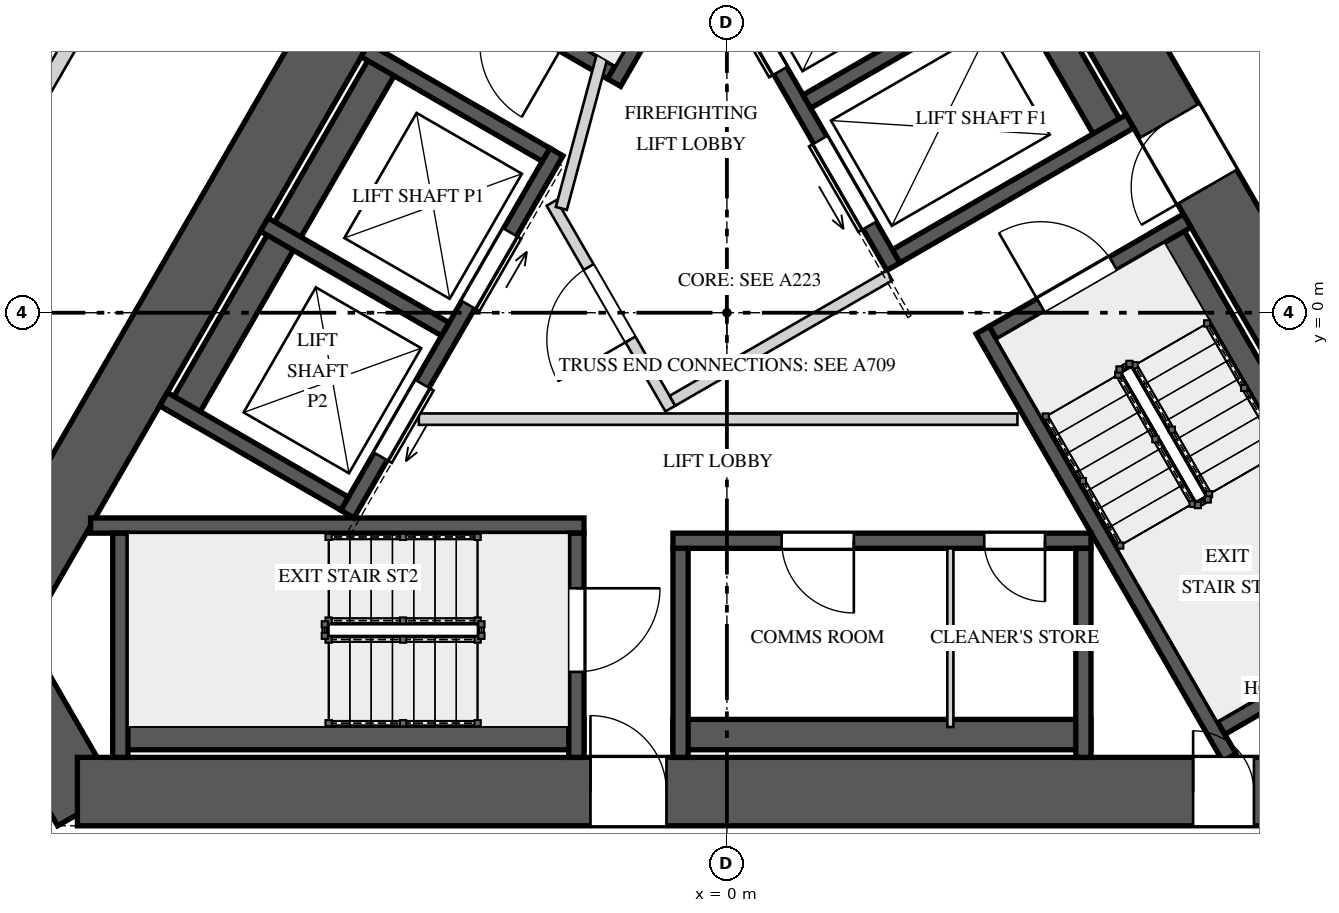
"""IFC4 building model, lengths in metres.
Left out: names, types, materials, properties, quantities, classifications, styles, units other than length and angle.
Written with IfcOpenShell. Run it as: python <this file> out.ifc"""

import sys

from ifc_helpers import new_model, si_unit, direction, frame, frame_2d, origin, place, context, subcontext, project, spatial, rectangle, extrude, element, fill, save


model = new_model("IFC4")
c1 = context("Model", 3, precision=1e-05, world=origin(), true_north=direction((0.0, 1.0)))
c2 = subcontext(c1, "Body", "Model", "MODEL_VIEW")
j1 = project(units=[si_unit("LENGTHUNIT", "METRE"), si_unit("PLANEANGLEUNIT", "RADIAN")], contexts=[c1])
p1 = place(None, origin())
s1 = spatial("IfcSite", under=j1, at=p1, CompositionType="ELEMENT")
p2 = place(p1, origin())
s2 = spatial("IfcBuilding", under=s1, at=p2, CompositionType="ELEMENT")
p3 = place(p2, frame((0.0, 0.0, 157.6)))
s3 = spatial("IfcBuildingStorey", under=s2, at=p3, CompositionType="ELEMENT", Elevation=157.6)
p4 = place(p3, frame((-1.184, 10.55, 0.0), z_axis=(0.0, 0.0, 1.0), x_axis=(-0.500004814304, -0.866022624227, 0.0)))
e1 = element("IfcWall", 1, at=p4, inside=s3, PredefinedType="SHEAR", context=c2, shape_type="SweptSolid", body=[
    extrude(rectangle(XDim=17.09, YDim=0.9, at=frame_2d((8.545, 0.0))), origin(), (0.0, 0.0, 1.0), 5.2),
])
p5 = place(p4, frame((6.75, 0.0, 0.0)))
e2 = element("IfcOpeningElement", 2, at=p5, cuts=e1, PredefinedType="OPENING", context=c2, shape_type="SweptSolid", body=[
    extrude(rectangle(XDim=1.0, YDim=2.4, at=frame_2d((0.5, 1.2))), frame((0.0, 0.46, 0.0), z_axis=(0.0, -1.0, 0.0), x_axis=(1.0, 0.0, 0.0)), (0.0, 0.0, 1.0), 0.92),
])
p6 = place(p3, frame((-9.858, -4.025, 0.0), z_axis=(0.0, 0.0, 1.0), x_axis=(0.500059191753, -0.865991226713, 0.0)))
e3 = element("IfcWall", 3, at=p6, inside=s3, PredefinedType="SHEAR", context=c2, shape_type="SweptSolid", body=[
    extrude(rectangle(XDim=2.887, YDim=0.9, at=frame_2d((1.443, 0.0))), origin(), (0.0, 0.0, 1.0), 5.2),
])
p7 = place(p3, frame((-8.545, -6.3, 0.0), z_axis=(0.0, 0.0, 1.0), x_axis=(1.0, 0.0, 0.0)))
e4 = element("IfcWall", 4, at=p7, inside=s3, PredefinedType="SHEAR", context=c2, shape_type="SweptSolid", body=[
    extrude(rectangle(XDim=17.09, YDim=0.9, at=frame_2d((8.545, 0.0))), origin(), (0.0, 0.0, 1.0), 5.2),
])
p8 = place(p7, frame((6.75, 0.0, 0.0)))
e5 = element("IfcOpeningElement", 5, at=p8, cuts=e4, PredefinedType="OPENING", context=c2, shape_type="SweptSolid", body=[
    extrude(rectangle(XDim=1.0, YDim=2.4, at=frame_2d((0.5, 1.2))), frame((0.0, 0.46, 0.0), z_axis=(0.0, -1.0, 0.0), x_axis=(1.0, 0.0, 0.0)), (0.0, 0.0, 1.0), 0.92),
])
p9 = place(p7, frame((14.678, 0.0, 0.0)))
e6 = element("IfcOpeningElement", 6, at=p9, cuts=e4, PredefinedType="OPENING", context=c2, shape_type="SweptSolid", body=[
    extrude(rectangle(XDim=0.8, YDim=2.1, at=frame_2d((0.4, 1.05))), frame((0.0, 0.46, 0.0), z_axis=(0.0, -1.0, 0.0), x_axis=(1.0, 0.0, 0.0)), (0.0, 0.0, 1.0), 0.92),
])
p10 = place(p3, frame((9.729, -4.25, 0.0), z_axis=(0.0, 0.0, 1.0), x_axis=(-0.500004814304, 0.866022624227, 0.0)))
e7 = element("IfcWall", 7, at=p10, inside=s3, PredefinedType="SHEAR", context=c2, shape_type="SweptSolid", body=[
    extrude(rectangle(XDim=17.09, YDim=0.9, at=frame_2d((8.545, 0.0))), origin(), (0.0, 0.0, 1.0), 5.2),
])
p11 = place(p10, frame((6.82, 0.0, 0.0)))
e8 = element("IfcOpeningElement", 8, at=p11, cuts=e7, PredefinedType="OPENING", context=c2, shape_type="SweptSolid", body=[
    extrude(rectangle(XDim=1.0, YDim=2.4, at=frame_2d((0.5, 1.2))), frame((0.0, 0.46, 0.0), z_axis=(0.0, -1.0, 0.0), x_axis=(1.0, 0.0, 0.0)), (0.0, 0.0, 1.0), 0.92),
])
p12 = place(p10, frame((14.184, 0.0, 0.0)))
e9 = element("IfcOpeningElement", 9, at=p12, cuts=e7, PredefinedType="OPENING", context=c2, shape_type="SweptSolid", body=[
    extrude(rectangle(XDim=0.8, YDim=2.1, at=frame_2d((0.4, 1.05))), frame((0.0, 0.46, 0.0), z_axis=(0.0, -1.0, 0.0), x_axis=(1.0, 0.0, 0.0)), (0.0, 0.0, 1.0), 0.92),
])
p13 = place(p3, frame((1.761, 8.65, 0.0), z_axis=(0.0, 0.0, 1.0), x_axis=(-0.500010023241, -0.866019616786, 0.0)))
e10 = element("IfcWall", 10, at=p13, inside=s3, PredefinedType="SOLIDWALL", context=c2, shape_type="SweptSolid", body=[
    extrude(rectangle(XDim=6.491, YDim=0.2, at=frame_2d((3.246, 0.0))), origin(), (0.0, 0.0, 1.0), 4.85),
])
p14 = place(p3, frame((-1.521, 3.165, 0.0), z_axis=(0.0, 0.0, 1.0), x_axis=(-0.866039495442, 0.49997559174, 0.0)))
e11 = element("IfcWall", 11, at=p14, inside=s3, PredefinedType="SOLIDWALL", context=c2, shape_type="SweptSolid", body=[
    extrude(rectangle(XDim=2.95, YDim=0.2, at=frame_2d((1.475, 0.0))), origin(), (0.0, 0.0, 1.0), 4.85),
])
p15 = place(p14, frame((0.725, 0.0, 0.0)))
e12 = element("IfcOpeningElement", 12, at=p15, cuts=e11, PredefinedType="OPENING", context=c2, shape_type="SweptSolid", body=[
    extrude(rectangle(XDim=1.1, YDim=2.4, at=frame_2d((0.55, 1.2))), frame((0.0, 0.11, 0.0), z_axis=(0.0, -1.0, 0.0), x_axis=(1.0, 0.0, 0.0)), (0.0, 0.0, 1.0), 0.22),
])
p16 = place(p3, frame((-8.08, -5.55, 0.0), z_axis=(0.0, 0.0, 1.0), x_axis=(1.0, 0.0, 0.0)))
e13 = element("IfcWall", 13, at=p16, inside=s3, PredefinedType="SOLIDWALL", context=c2, shape_type="SweptSolid", body=[
    extrude(rectangle(XDim=6.2, YDim=0.4, at=frame_2d((3.1, 0.0))), origin(), (0.0, 0.0, 1.0), 4.85),
])
p17 = place(p3, frame((-8.372, -2.8, 0.0), z_axis=(0.0, 0.0, 1.0), x_axis=(1.0, 0.0, 0.0)))
e14 = element("IfcWall", 14, at=p17, inside=s3, PredefinedType="SOLIDWALL", context=c2, shape_type="SweptSolid", body=[
    extrude(rectangle(XDim=6.492, YDim=0.2, at=frame_2d((3.246, 0.0))), origin(), (0.0, 0.0, 1.0), 4.85),
])
p18 = place(p3, frame((-7.98, -2.9, 0.0), z_axis=(0.0, 0.0, 1.0), x_axis=(0.0, -1.0, 0.0)))
e15 = element("IfcWall", 15, at=p18, inside=s3, PredefinedType="SOLIDWALL", context=c2, shape_type="SweptSolid", body=[
    extrude(rectangle(XDim=2.95, YDim=0.2, at=frame_2d((1.475, 0.0))), origin(), (0.0, 0.0, 1.0), 4.85),
])
p19 = place(p3, frame((-1.98, -2.9, 0.0), z_axis=(0.0, 0.0, 1.0), x_axis=(0.0, -1.0, 0.0)))
e16 = element("IfcWall", 16, at=p19, inside=s3, PredefinedType="SOLIDWALL", context=c2, shape_type="SweptSolid", body=[
    extrude(rectangle(XDim=2.95, YDim=0.2, at=frame_2d((1.475, 0.0))), origin(), (0.0, 0.0, 1.0), 4.85),
])
p20 = place(p19, frame((0.725, 0.0, 0.0)))
e17 = element("IfcOpeningElement", 17, at=p20, cuts=e16, PredefinedType="OPENING", context=c2, shape_type="SweptSolid", body=[
    extrude(rectangle(XDim=1.1, YDim=2.4, at=frame_2d((0.55, 1.2))), frame((0.0, 0.11, 0.0), z_axis=(0.0, -1.0, 0.0), x_axis=(1.0, 0.0, 0.0)), (0.0, 0.0, 1.0), 0.22),
])
p21 = place(p3, frame((8.846, -4.222, 0.0), z_axis=(0.0, 0.0, 1.0), x_axis=(-0.500009909098, 0.866019682689, 0.0)))
e18 = element("IfcWall", 18, at=p21, inside=s3, PredefinedType="SOLIDWALL", context=c2, shape_type="SweptSolid", body=[
    extrude(rectangle(XDim=6.2, YDim=0.4, at=frame_2d((3.1, 0.0))), origin(), (0.0, 0.0, 1.0), 4.85),
])
p22 = place(p3, frame((6.611, -5.85, 0.0), z_axis=(0.0, 0.0, 1.0), x_axis=(-0.499965531574, 0.866045303225, 0.0)))
e19 = element("IfcWall", 19, at=p22, inside=s3, PredefinedType="SOLIDWALL", context=c2, shape_type="SweptSolid", body=[
    extrude(rectangle(XDim=6.492, YDim=0.2, at=frame_2d((3.246, 0.0))), origin(), (0.0, 0.0, 1.0), 4.85),
])
p23 = place(p3, frame((6.501, -5.461, 0.0), z_axis=(0.0, 0.0, 1.0), x_axis=(0.866003658127, 0.500037662692, 0.0)))
e20 = element("IfcWall", 20, at=p23, inside=s3, PredefinedType="SOLIDWALL", context=c2, shape_type="SweptSolid", body=[
    extrude(rectangle(XDim=2.95, YDim=0.2, at=frame_2d((1.475, 0.0))), origin(), (0.0, 0.0, 1.0), 4.85),
])
p24 = place(p3, frame((3.501, -0.265, 0.0), z_axis=(0.0, 0.0, 1.0), x_axis=(0.866039495442, 0.49997559174, 0.0)))
e21 = element("IfcWall", 21, at=p24, inside=s3, PredefinedType="SOLIDWALL", context=c2, shape_type="SweptSolid", body=[
    extrude(rectangle(XDim=2.95, YDim=0.2, at=frame_2d((1.475, 0.0))), origin(), (0.0, 0.0, 1.0), 4.85),
])
p25 = place(p24, frame((0.725, 0.0, 0.0)))
e22 = element("IfcOpeningElement", 22, at=p25, cuts=e21, PredefinedType="OPENING", context=c2, shape_type="SweptSolid", body=[
    extrude(rectangle(XDim=1.1, YDim=2.4, at=frame_2d((0.55, 1.2))), frame((0.0, 0.11, 0.0), z_axis=(0.0, -1.0, 0.0), x_axis=(1.0, 0.0, 0.0)), (0.0, 0.0, 1.0), 0.22),
])
p26 = place(p3, frame((-2.243, 2.115, 0.0), z_axis=(0.0, 0.0, 1.0), x_axis=(-0.499996545922, -0.866027397988, 0.0)))
e23 = element("IfcWall", 23, at=p26, inside=s3, PredefinedType="SOLIDWALL", context=c2, shape_type="SweptSolid", body=[
    extrude(rectangle(XDim=5.5, YDim=0.2, at=frame_2d((2.75, 0.0))), origin(), (0.0, 0.0, 1.0), 4.85),
])
p27 = place(p26, frame((1.22, 0.0, 0.0)))
e24 = element("IfcOpeningElement", 24, at=p27, cuts=e23, PredefinedType="OPENING", context=c2, shape_type="SweptSolid", body=[
    extrude(rectangle(XDim=1.1, YDim=2.1, at=frame_2d((0.55, 1.05))), frame((0.0, 0.11, 0.0), z_axis=(0.0, -1.0, 0.0), x_axis=(1.0, 0.0, 0.0)), (0.0, 0.0, 1.0), 0.22),
])
p28 = place(p26, frame((3.525, 0.0, 0.0)))
e25 = element("IfcOpeningElement", 25, at=p28, cuts=e23, PredefinedType="OPENING", context=c2, shape_type="SweptSolid", body=[
    extrude(rectangle(XDim=1.1, YDim=2.1, at=frame_2d((0.55, 1.05))), frame((0.0, 0.11, 0.0), z_axis=(0.0, -1.0, 0.0), x_axis=(1.0, 0.0, 0.0)), (0.0, 0.0, 1.0), 0.22),
])
p29 = place(p3, frame((-4.451, 3.39, 0.0), z_axis=(0.0, 0.0, 1.0), x_axis=(-0.499996545922, -0.866027397988, 0.0)))
e26 = element("IfcWall", 26, at=p29, inside=s3, PredefinedType="SOLIDWALL", context=c2, shape_type="SweptSolid", body=[
    extrude(rectangle(XDim=5.5, YDim=0.4, at=frame_2d((2.75, 0.0))), origin(), (0.0, 0.0, 1.0), 4.85),
])
for number, where, z_axis, x_axis in (
    (27, (-2.38, 2.078, 0.0), (0.0, 0.0, 1.0), (-0.866, 0.5, 0.0)),
    (28, (-3.705, -0.217, 0.0), (0.0, 0.0, 1.0), (-0.866, 0.5, 0.0)),
):
    element("IfcWall", number, at=place(p3, frame(where, z_axis=z_axis, x_axis=x_axis)), inside=s3, PredefinedType="SOLIDWALL", context=c2, shape_type="SweptSolid", body=[
        extrude(rectangle(XDim=2.75, YDim=0.2, at=frame_2d((1.375, 0.0))), origin(), (0.0, 0.0, 1.0), 4.85),
    ])
p30 = place(p3, frame((-5.03, -2.512, 0.0), z_axis=(0.0, 0.0, 1.0), x_axis=(-0.866005201286, 0.500034990121, 0.0)))
e29 = element("IfcWall", 29, at=p30, inside=s3, PredefinedType="SOLIDWALL", context=c2, shape_type="SweptSolid", body=[
    extrude(rectangle(XDim=2.75, YDim=0.2, at=frame_2d((1.375, 0.0))), origin(), (0.0, 0.0, 1.0), 4.85),
])
p31 = place(p3, frame((4.79, -3.0, 0.0), z_axis=(0.0, 0.0, 1.0), x_axis=(-1.0, 0.0, 0.0)))
e30 = element("IfcWall", 30, at=p31, inside=s3, PredefinedType="SOLIDWALL", context=c2, shape_type="SweptSolid", body=[
    extrude(rectangle(XDim=5.5, YDim=0.2, at=frame_2d((2.75, 0.0))), origin(), (0.0, 0.0, 1.0), 4.85),
])
p32 = place(p31, frame((3.12, 0.0, 0.0)))
e31 = element("IfcOpeningElement", 31, at=p32, cuts=e30, PredefinedType="OPENING", context=c2, shape_type="SweptSolid", body=[
    extrude(rectangle(XDim=0.95, YDim=2.4, at=frame_2d((0.475, 1.2))), frame((0.0, 0.11, 0.0), z_axis=(0.0, -1.0, 0.0), x_axis=(1.0, 0.0, 0.0)), (0.0, 0.0, 1.0), 0.22),
])
p33 = place(p31, frame((0.605, 0.0, 0.0)))
e32 = element("IfcOpeningElement", 32, at=p33, cuts=e30, PredefinedType="OPENING", context=c2, shape_type="SweptSolid", body=[
    extrude(rectangle(XDim=0.8, YDim=2.1, at=frame_2d((0.4, 1.05))), frame((0.0, 0.11, 0.0), z_axis=(0.0, -1.0, 0.0), x_axis=(1.0, 0.0, 0.0)), (0.0, 0.0, 1.0), 0.22),
])
p34 = place(p3, frame((-0.71, -5.55, 0.0), z_axis=(0.0, 0.0, 1.0), x_axis=(1.0, 0.0, 0.0)))
e33 = element("IfcWall", 33, at=p34, inside=s3, PredefinedType="SOLIDWALL", context=c2, shape_type="SweptSolid", body=[
    extrude(rectangle(XDim=5.5, YDim=0.4, at=frame_2d((2.75, 0.0))), origin(), (0.0, 0.0, 1.0), 4.85),
])
for number, where, z_axis, x_axis in (
    (34, (-0.61, -3.1, 0.0), (0.0, 0.0, 1.0), (0.0, -1.0, 0.0)),
    (35, (4.69, -3.1, 0.0), (0.0, 0.0, 1.0), (0.0, -1.0, 0.0)),
):
    element("IfcWall", number, at=place(p3, frame(where, z_axis=z_axis, x_axis=x_axis)), inside=s3, PredefinedType="SOLIDWALL", context=c2, shape_type="SweptSolid", body=[
        extrude(rectangle(XDim=2.75, YDim=0.2, at=frame_2d((1.375, 0.0))), origin(), (0.0, 0.0, 1.0), 4.85),
    ])
p35 = place(p3, frame((2.94, -3.1, 0.0), z_axis=(0.0, 0.0, 1.0), x_axis=(0.0, -1.0, 0.0)))
e36 = element("IfcWall", 36, at=p35, inside=s3, PredefinedType="PARTITIONING", context=c2, shape_type="SweptSolid", body=[
    extrude(rectangle(XDim=2.35, YDim=0.08, at=frame_2d((1.175, 0.0))), origin(), (0.0, 0.0, 1.0), 4.85),
])
p36 = place(p3, frame((2.19, 0.606, 0.0), z_axis=(0.0, 0.0, 1.0), x_axis=(-0.500002801628, 0.866023786258, 0.0)))
e37 = element("IfcWall", 37, at=p36, inside=s3, PredefinedType="SOLIDWALL", context=c2, shape_type="SweptSolid", body=[
    extrude(rectangle(XDim=4.9, YDim=0.2, at=frame_2d((2.45, 0.0))), origin(), (0.0, 0.0, 1.0), 4.85),
])
p37 = place(p36, frame((0.625, 0.0, 0.0)))
e38 = element("IfcOpeningElement", 38, at=p37, cuts=e37, PredefinedType="OPENING", context=c2, shape_type="SweptSolid", body=[
    extrude(rectangle(XDim=1.3, YDim=2.1, at=frame_2d((0.65, 1.05))), frame((0.0, 0.11, 0.0), z_axis=(0.0, -1.0, 0.0), x_axis=(1.0, 0.0, 0.0)), (0.0, 0.0, 1.0), 0.22),
])
p38 = place(p36, frame((2.975, 0.0, 0.0)))
e39 = element("IfcOpeningElement", 39, at=p38, cuts=e37, PredefinedType="OPENING", context=c2, shape_type="SweptSolid", body=[
    extrude(rectangle(XDim=1.3, YDim=2.1, at=frame_2d((0.65, 1.05))), frame((0.0, 0.11, 0.0), z_axis=(0.0, -1.0, 0.0), x_axis=(1.0, 0.0, 0.0)), (0.0, 0.0, 1.0), 0.22),
])
p39 = place(p3, frame((5.092, 2.281, 0.0), z_axis=(0.0, 0.0, 1.0), x_axis=(-0.500018594424, 0.866014668023, 0.0)))
e40 = element("IfcWall", 40, at=p39, inside=s3, PredefinedType="SOLIDWALL", context=c2, shape_type="SweptSolid", body=[
    extrude(rectangle(XDim=4.9, YDim=0.4, at=frame_2d((2.45, 0.0))), origin(), (0.0, 0.0, 1.0), 4.85),
])
for number, where, z_axis, x_axis in (
    (41, (2.227, 0.743, 0.0), (0.0, 0.0, 1.0), (0.866, 0.5, 0.0)),
    (42, (1.052, 2.778, 0.0), (0.0, 0.0, 1.0), (0.866, 0.5, 0.0)),
):
    element("IfcWall", number, at=place(p3, frame(where, z_axis=z_axis, x_axis=x_axis)), inside=s3, PredefinedType="SOLIDWALL", context=c2, shape_type="SweptSolid", body=[
        extrude(rectangle(XDim=3.55, YDim=0.2, at=frame_2d((1.775, 0.0))), origin(), (0.0, 0.0, 1.0), 4.85),
    ])
p40 = place(p3, frame((-0.744, -1.261, 0.0), z_axis=(0.0, 0.0, 1.0), x_axis=(-0.500004234368, 0.866022959057, 0.0)))
e43 = element("IfcWall", 43, at=p40, inside=s3, PredefinedType="PARTITIONING", context=c2, shape_type="SweptSolid", body=[
    extrude(rectangle(XDim=3.125, YDim=0.15, at=frame_2d((1.562, 0.0))), origin(), (0.0, 0.0, 1.0), 4.85),
])
p41 = place(p40, frame((1.05, 0.0, 0.0)))
e44 = element("IfcOpeningElement", 44, at=p41, cuts=e43, PredefinedType="OPENING", context=c2, shape_type="SweptSolid", body=[
    extrude(rectangle(XDim=1.1, YDim=2.4, at=frame_2d((0.55, 1.2))), frame((0.0, 0.085, 0.0), z_axis=(0.0, -1.0, 0.0), x_axis=(1.0, 0.0, 0.0)), (0.0, 0.0, 1.0), 0.17),
])
p42 = place(p3, frame((-0.717, -1.159, 0.0), z_axis=(0.0, 0.0, 1.0), x_axis=(0.866008176907, 0.50002983664, 0.0)))
e45 = element("IfcWall", 45, at=p42, inside=s3, PredefinedType="PARTITIONING", context=c2, shape_type="SweptSolid", body=[
    extrude(rectangle(XDim=3.3, YDim=0.15, at=frame_2d((1.65, 0.0))), origin(), (0.0, 0.0, 1.0), 4.85),
])
p43 = place(p3, frame((-2.178, 1.372, 0.0), z_axis=(0.0, 0.0, 1.0), x_axis=(0.258808958833, 0.96592852884, 0.0)))
e46 = element("IfcWall", 46, at=p43, inside=s3, PredefinedType="PARTITIONING", context=c2, shape_type="SweptSolid", body=[
    extrude(rectangle(XDim=2.903, YDim=0.15, at=frame_2d((1.451, 0.0))), origin(), (0.0, 0.0, 1.0), 4.85),
])
p44 = place(p3, frame((-4.053, -1.4, 0.0), z_axis=(0.0, 0.0, 1.0), x_axis=(1.0, 0.0, 0.0)))
e47 = element("IfcWall", 47, at=p44, inside=s3, PredefinedType="PARTITIONING", context=c2, shape_type="SweptSolid", body=[
    extrude(rectangle(XDim=7.876, YDim=0.15, at=frame_2d((3.938, 0.0))), origin(), (0.0, 0.0, 1.0), 4.85),
])
p45 = place(p3, frame((-9.001, 2.909, 0.0), z_axis=(0.0, 0.0, 1.0), x_axis=(0.50012879774, 0.865951029603, 0.0)))
e48 = element("IfcWall", 48, at=p45, inside=s3, PredefinedType="SOLIDWALL", context=c2, shape_type="SweptSolid", body=[
    extrude(rectangle(XDim=0.711, YDim=0.2, at=frame_2d((0.355, 0.0))), origin(), (0.0, 0.0, 1.0), 4.15),
])
p46 = place(p20, origin())
e49 = element("IfcDoor", 49, at=p46, inside=s3, OperationType="SINGLE_SWING_LEFT", PredefinedType="DOOR", context=c2, shape_type="SweptSolid", body=[
    extrude(rectangle(XDim=1.1, YDim=2.4, at=frame_2d((0.55, 1.2))), frame((0.0, 0.025, 0.0), z_axis=(0.0, -1.0, 0.0), x_axis=(1.0, 0.0, 0.0)), (0.0, 0.0, 1.0), 0.05),
])
fill(e17, e49)
p47 = place(p25, origin())
e50 = element("IfcDoor", 50, at=p47, inside=s3, OperationType="SINGLE_SWING_RIGHT", PredefinedType="DOOR", context=c2, shape_type="SweptSolid", body=[
    extrude(rectangle(XDim=1.1, YDim=2.4, at=frame_2d((0.55, 1.2))), frame((0.0, 0.025, 0.0), z_axis=(0.0, -1.0, 0.0), x_axis=(1.0, 0.0, 0.0)), (0.0, 0.0, 1.0), 0.05),
])
fill(e22, e50)
p48 = place(p27, origin())
e51 = element("IfcDoor", 51, at=p48, inside=s3, OperationType="SLIDING_TO_LEFT", PredefinedType="DOOR", context=c2, shape_type="SweptSolid", body=[
    extrude(rectangle(XDim=1.1, YDim=2.1, at=frame_2d((0.55, 1.05))), frame((0.0, 0.025, 0.0), z_axis=(0.0, -1.0, 0.0), x_axis=(1.0, 0.0, 0.0)), (0.0, 0.0, 1.0), 0.05),
])
fill(e24, e51)
p49 = place(p28, origin())
e52 = element("IfcDoor", 52, at=p49, inside=s3, OperationType="SLIDING_TO_RIGHT", PredefinedType="DOOR", context=c2, shape_type="SweptSolid", body=[
    extrude(rectangle(XDim=1.1, YDim=2.1, at=frame_2d((0.55, 1.05))), frame((0.0, 0.025, 0.0), z_axis=(0.0, -1.0, 0.0), x_axis=(1.0, 0.0, 0.0)), (0.0, 0.0, 1.0), 0.05),
])
fill(e25, e52)
p50 = place(p32, origin())
e53 = element("IfcDoor", 53, at=p50, inside=s3, OperationType="SINGLE_SWING_LEFT", PredefinedType="DOOR", context=c2, shape_type="SweptSolid", body=[
    extrude(rectangle(XDim=0.95, YDim=2.4, at=frame_2d((0.475, 1.2))), frame((0.0, 0.025, 0.0), z_axis=(0.0, -1.0, 0.0), x_axis=(1.0, 0.0, 0.0)), (0.0, 0.0, 1.0), 0.05),
])
fill(e31, e53)
p51 = place(p33, origin())
e54 = element("IfcDoor", 54, at=p51, inside=s3, OperationType="SINGLE_SWING_RIGHT", PredefinedType="DOOR", context=c2, shape_type="SweptSolid", body=[
    extrude(rectangle(XDim=0.8, YDim=2.1, at=frame_2d((0.4, 1.05))), frame((0.0, 0.025, 0.0), z_axis=(0.0, -1.0, 0.0), x_axis=(1.0, 0.0, 0.0)), (0.0, 0.0, 1.0), 0.05),
])
fill(e32, e54)
p52 = place(p37, origin())
e55 = element("IfcDoor", 55, at=p52, inside=s3, OperationType="SLIDING_TO_LEFT", PredefinedType="DOOR", context=c2, shape_type="SweptSolid", body=[
    extrude(rectangle(XDim=1.3, YDim=2.1, at=frame_2d((0.65, 1.05))), frame((0.0, 0.025, 0.0), z_axis=(0.0, -1.0, 0.0), x_axis=(1.0, 0.0, 0.0)), (0.0, 0.0, 1.0), 0.05),
])
fill(e38, e55)
p53 = place(p38, origin())
e56 = element("IfcDoor", 56, at=p53, inside=s3, OperationType="SLIDING_TO_RIGHT", PredefinedType="DOOR", context=c2, shape_type="SweptSolid", body=[
    extrude(rectangle(XDim=1.3, YDim=2.1, at=frame_2d((0.65, 1.05))), frame((0.0, 0.025, 0.0), z_axis=(0.0, -1.0, 0.0), x_axis=(1.0, 0.0, 0.0)), (0.0, 0.0, 1.0), 0.05),
])
fill(e39, e56)
p54 = place(p41, origin())
e57 = element("IfcDoor", 57, at=p54, inside=s3, OperationType="SINGLE_SWING_LEFT", PredefinedType="DOOR", context=c2, shape_type="SweptSolid", body=[
    extrude(rectangle(XDim=1.1, YDim=2.4, at=frame_2d((0.55, 1.2))), frame((0.0, 0.025, 0.0), z_axis=(0.0, -1.0, 0.0), x_axis=(1.0, 0.0, 0.0)), (0.0, 0.0, 1.0), 0.05),
])
fill(e44, e57)
p55 = place(p8, origin())
e58 = element("IfcDoor", 58, at=p55, inside=s3, OperationType="SINGLE_SWING_LEFT", PredefinedType="DOOR", context=c2, shape_type="SweptSolid", body=[
    extrude(rectangle(XDim=1.0, YDim=2.4, at=frame_2d((0.5, 1.2))), frame((0.0, 0.025, 0.0), z_axis=(0.0, -1.0, 0.0), x_axis=(1.0, 0.0, 0.0)), (0.0, 0.0, 1.0), 0.05),
])
fill(e5, e58)
p56 = place(p11, origin())
e59 = element("IfcDoor", 59, at=p56, inside=s3, OperationType="SINGLE_SWING_RIGHT", PredefinedType="DOOR", context=c2, shape_type="SweptSolid", body=[
    extrude(rectangle(XDim=1.0, YDim=2.4, at=frame_2d((0.5, 1.2))), frame((0.0, 0.025, 0.0), z_axis=(0.0, -1.0, 0.0), x_axis=(1.0, 0.0, 0.0)), (0.0, 0.0, 1.0), 0.05),
])
fill(e8, e59)
p57 = place(p9, origin())
e60 = element("IfcDoor", 60, at=p57, inside=s3, OperationType="SINGLE_SWING_LEFT", PredefinedType="DOOR", context=c2, shape_type="SweptSolid", body=[
    extrude(rectangle(XDim=0.8, YDim=2.1, at=frame_2d((0.4, 1.05))), frame((0.0, 0.025, 0.0), z_axis=(0.0, -1.0, 0.0), x_axis=(1.0, 0.0, 0.0)), (0.0, 0.0, 1.0), 0.05),
])
fill(e6, e60)
save(model, sys.argv[1])
